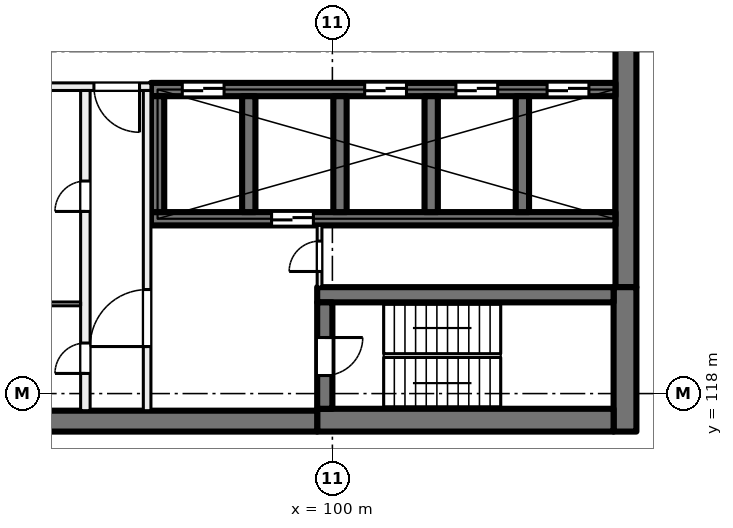
"""IFC4 building model, lengths in metres.
Left out: names, types, materials, properties, quantities, classifications, styles, units other than length and angle.
Written with IfcOpenShell. Run it as: python <this file> out.ifc"""

import sys

from ifc_helpers import new_model, si_unit, direction, frame, frame_2d, origin, place, context, subcontext, project, spatial, rectangle, extrude, element, fill, save


model = new_model("IFC4")
c1 = context("Model", 3, precision=1e-05, world=origin(), true_north=direction((0.0, 1.0)))
c2 = subcontext(c1, "Body", "Model", "MODEL_VIEW")
j1 = project(units=[si_unit("LENGTHUNIT", "METRE"), si_unit("PLANEANGLEUNIT", "RADIAN")], contexts=[c1])
p1 = place(None, origin())
s1 = spatial("IfcSite", under=j1, at=p1, CompositionType="ELEMENT")
p2 = place(p1, origin())
s2 = spatial("IfcBuilding", under=s1, at=p2, CompositionType="ELEMENT")
p3 = place(p2, frame((0.0, 0.0, 138.5)))
s3 = spatial("IfcBuildingStorey", under=s2, at=p3, CompositionType="ELEMENT", Elevation=138.5)
p4 = place(p3, frame((107.725, 135.2, 0.0), z_axis=(0.0, 0.0, 1.0), x_axis=(0.0, -1.0, 0.0)))
e1 = element("IfcWall", 1, at=p4, inside=s3, PredefinedType="SHEAR", context=c2, shape_type="SweptSolid", body=[
    extrude(rectangle(XDim=14.4, YDim=0.55, at=frame_2d((7.2, 0.0))), origin(), (0.0, 0.0, 1.0), 4.0),
])
p5 = place(p3, frame((107.7, 120.8, 0.0), z_axis=(0.0, 0.0, 1.0), x_axis=(0.0, -1.0, 0.0)))
e2 = element("IfcWall", 2, at=p5, inside=s3, PredefinedType="SHEAR", context=c2, shape_type="SweptSolid", body=[
    extrude(rectangle(XDim=3.8, YDim=0.6, at=frame_2d((1.9, 0.0))), origin(), (0.0, 0.0, 1.0), 4.0),
])
p6 = place(p3, frame((107.4, 117.3, 0.0), z_axis=(0.0, 0.0, 1.0), x_axis=(-1.0, 0.0, 0.0)))
e3 = element("IfcWall", 3, at=p6, inside=s3, PredefinedType="SHEAR", context=c2, shape_type="SweptSolid", body=[
    extrude(rectangle(XDim=7.8, YDim=0.6, at=frame_2d((3.9, 0.0))), origin(), (0.0, 0.0, 1.0), 4.0),
])
p7 = place(p3, frame((99.6, 117.275, 0.0), z_axis=(0.0, 0.0, 1.0), x_axis=(-1.0, 0.0, 0.0)))
e4 = element("IfcWall", 4, at=p7, inside=s3, PredefinedType="SHEAR", context=c2, shape_type="SweptSolid", body=[
    extrude(rectangle(XDim=8.95, YDim=0.55, at=frame_2d((4.475, 0.0))), origin(), (0.0, 0.0, 1.0), 4.0),
])
p8 = place(p3, frame((107.4, 120.6, 0.0), z_axis=(0.0, 0.0, 1.0), x_axis=(-1.0, 0.0, 0.0)))
e5 = element("IfcWall", 5, at=p8, inside=s3, PredefinedType="SHEAR", context=c2, shape_type="SweptSolid", body=[
    extrude(rectangle(XDim=7.8, YDim=0.4, at=frame_2d((3.9, 0.0))), origin(), (0.0, 0.0, 1.0), 4.0),
])
p9 = place(p3, frame((99.8, 120.4, 0.0), z_axis=(0.0, 0.0, 1.0), x_axis=(0.0, -1.0, 0.0)))
e6 = element("IfcWall", 6, at=p9, inside=s3, PredefinedType="SHEAR", context=c2, shape_type="SweptSolid", body=[
    extrude(rectangle(XDim=2.8, YDim=0.4, at=frame_2d((1.4, 0.0))), origin(), (0.0, 0.0, 1.0), 4.0),
])
p10 = place(p9, frame((0.925, 0.0, 0.0)))
e7 = element("IfcOpeningElement", 7, at=p10, cuts=e6, PredefinedType="OPENING", context=c2, shape_type="SweptSolid", body=[
    extrude(rectangle(XDim=1.0, YDim=2.1, at=frame_2d((0.5, 1.05))), frame((0.0, 0.21, 0.0), z_axis=(0.0, -1.0, 0.0), x_axis=(1.0, 0.0, 0.0)), (0.0, 0.0, 1.0), 0.42),
])
p11 = place(p3, frame((107.45, 126.0, 0.0), z_axis=(0.0, 0.0, 1.0), x_axis=(-1.0, 0.0, 0.0)))
e8 = element("IfcWall", 8, at=p11, inside=s3, PredefinedType="SHEAR", context=c2, shape_type="SweptSolid", body=[
    extrude(rectangle(XDim=12.225, YDim=0.35, at=frame_2d((6.112, 0.0))), origin(), (0.0, 0.0, 1.0), 4.0),
])
p12 = place(p11, frame((0.7, 0.0, 0.0)))
e9 = element("IfcOpeningElement", 9, at=p12, cuts=e8, PredefinedType="OPENING", context=c2, shape_type="SweptSolid", body=[
    extrude(rectangle(XDim=1.1, YDim=2.1, at=frame_2d((0.55, 1.05))), frame((0.0, 0.185, 0.0), z_axis=(0.0, -1.0, 0.0), x_axis=(1.0, 0.0, 0.0)), (0.0, 0.0, 1.0), 0.37),
])
p13 = place(p11, frame((3.1, 0.0, 0.0)))
e10 = element("IfcOpeningElement", 10, at=p13, cuts=e8, PredefinedType="OPENING", context=c2, shape_type="SweptSolid", body=[
    extrude(rectangle(XDim=1.1, YDim=2.1, at=frame_2d((0.55, 1.05))), frame((0.0, 0.185, 0.0), z_axis=(0.0, -1.0, 0.0), x_axis=(1.0, 0.0, 0.0)), (0.0, 0.0, 1.0), 0.37),
])
p14 = place(p11, frame((5.5, 0.0, 0.0)))
e11 = element("IfcOpeningElement", 11, at=p14, cuts=e8, PredefinedType="OPENING", context=c2, shape_type="SweptSolid", body=[
    extrude(rectangle(XDim=1.1, YDim=2.1, at=frame_2d((0.55, 1.05))), frame((0.0, 0.185, 0.0), z_axis=(0.0, -1.0, 0.0), x_axis=(1.0, 0.0, 0.0)), (0.0, 0.0, 1.0), 0.37),
])
p15 = place(p11, frame((10.3, 0.0, 0.0)))
e12 = element("IfcOpeningElement", 12, at=p15, cuts=e8, PredefinedType="OPENING", context=c2, shape_type="SweptSolid", body=[
    extrude(rectangle(XDim=1.1, YDim=2.1, at=frame_2d((0.55, 1.05))), frame((0.0, 0.185, 0.0), z_axis=(0.0, -1.0, 0.0), x_axis=(1.0, 0.0, 0.0)), (0.0, 0.0, 1.0), 0.37),
])
p16 = place(p3, frame((107.45, 122.6, 0.0), z_axis=(0.0, 0.0, 1.0), x_axis=(-1.0, 0.0, 0.0)))
e13 = element("IfcWall", 13, at=p16, inside=s3, PredefinedType="SHEAR", context=c2, shape_type="SweptSolid", body=[
    extrude(rectangle(XDim=12.225, YDim=0.35, at=frame_2d((6.112, 0.0))), origin(), (0.0, 0.0, 1.0), 4.0),
])
p17 = place(p16, frame((7.95, 0.0, 0.0)))
e14 = element("IfcOpeningElement", 14, at=p17, cuts=e13, PredefinedType="OPENING", context=c2, shape_type="SweptSolid", body=[
    extrude(rectangle(XDim=1.1, YDim=2.1, at=frame_2d((0.55, 1.05))), frame((0.0, 0.185, 0.0), z_axis=(0.0, -1.0, 0.0), x_axis=(1.0, 0.0, 0.0)), (0.0, 0.0, 1.0), 0.37),
])
for number, where, z_axis, x_axis in (
    (15, (105.0, 125.825, 0.0), (0.0, 0.0, 1.0), (0.0, -1.0, 0.0)),
    (16, (102.6, 125.825, 0.0), (0.0, 0.0, 1.0), (0.0, -1.0, 0.0)),
    (17, (100.2, 125.825, 0.0), (0.0, 0.0, 1.0), (0.0, -1.0, 0.0)),
    (18, (97.8, 125.825, 0.0), (0.0, 0.0, 1.0), (0.0, -1.0, 0.0)),
    (19, (95.4, 125.825, 0.0), (0.0, 0.0, 1.0), (0.0, -1.0, 0.0)),
):
    element("IfcWall", number, at=place(p3, frame(where, z_axis=z_axis, x_axis=x_axis)), inside=s3, PredefinedType="SHEAR", context=c2, shape_type="SweptSolid", body=[
        extrude(rectangle(XDim=3.05, YDim=0.35, at=frame_2d((1.525, 0.0))), origin(), (0.0, 0.0, 1.0), 4.0),
    ])
p18 = place(p3, frame((95.225, 126.075, 0.0), z_axis=(0.0, 0.0, 1.0), x_axis=(-1.0, 0.0, 0.0)))
e20 = element("IfcWall", 20, at=p18, inside=s3, PredefinedType="PARTITIONING", context=c2, shape_type="SweptSolid", body=[
    extrude(rectangle(XDim=3.875, YDim=0.2, at=frame_2d((1.938, 0.0))), origin(), (0.0, 0.0, 1.0), 3.625),
])
p19 = place(p18, frame((0.3, 0.0, 0.0)))
e21 = element("IfcOpeningElement", 21, at=p19, cuts=e20, PredefinedType="OPENING", context=c2, shape_type="SweptSolid", body=[
    extrude(rectangle(XDim=1.2, YDim=2.1, at=frame_2d((0.6, 1.05))), frame((0.0, 0.11, 0.0), z_axis=(0.0, -1.0, 0.0), x_axis=(1.0, 0.0, 0.0)), (0.0, 0.0, 1.0), 0.22),
])
p20 = place(p3, frame((95.125, 117.55, 0.0), z_axis=(0.0, 0.0, 1.0), x_axis=(0.0, 1.0, 0.0)))
e22 = element("IfcWall", 22, at=p20, inside=s3, PredefinedType="PARTITIONING", context=c2, shape_type="SweptSolid", body=[
    extrude(rectangle(XDim=8.425, YDim=0.2, at=frame_2d((4.212, 0.0))), origin(), (0.0, 0.0, 1.0), 3.625),
])
p21 = place(p20, frame((1.688, 0.0, 0.0)))
e23 = element("IfcOpeningElement", 23, at=p21, cuts=e22, PredefinedType="OPENING", context=c2, shape_type="SweptSolid", body=[
    extrude(rectangle(XDim=1.5, YDim=2.1, at=frame_2d((0.75, 1.05))), frame((0.0, 0.11, 0.0), z_axis=(0.0, -1.0, 0.0), x_axis=(1.0, 0.0, 0.0)), (0.0, 0.0, 1.0), 0.22),
])
p22 = place(p3, frame((93.5, 117.55, 0.0), z_axis=(0.0, 0.0, 1.0), x_axis=(0.0, 1.0, 0.0)))
e24 = element("IfcWall", 24, at=p22, inside=s3, PredefinedType="PARTITIONING", context=c2, shape_type="SweptSolid", body=[
    extrude(rectangle(XDim=8.425, YDim=0.25, at=frame_2d((4.212, 0.0))), origin(), (0.0, 0.0, 1.0), 3.625),
])
p23 = place(p22, frame((5.242, 0.0, 0.0)))
e25 = element("IfcOpeningElement", 25, at=p23, cuts=e24, PredefinedType="OPENING", context=c2, shape_type="SweptSolid", body=[
    extrude(rectangle(XDim=0.8, YDim=2.1, at=frame_2d((0.4, 1.05))), frame((0.0, 0.135, 0.0), z_axis=(0.0, -1.0, 0.0), x_axis=(1.0, 0.0, 0.0)), (0.0, 0.0, 1.0), 0.27),
])
p24 = place(p22, frame((0.98, 0.0, 0.0)))
e26 = element("IfcOpeningElement", 26, at=p24, cuts=e24, PredefinedType="OPENING", context=c2, shape_type="SweptSolid", body=[
    extrude(rectangle(XDim=0.8, YDim=2.1, at=frame_2d((0.4, 1.05))), frame((0.0, 0.135, 0.0), z_axis=(0.0, -1.0, 0.0), x_axis=(1.0, 0.0, 0.0)), (0.0, 0.0, 1.0), 0.27),
])
p25 = place(p3, frame((99.663, 120.8, 0.0), z_axis=(0.0, 0.0, 1.0), x_axis=(0.0, 1.0, 0.0)))
e27 = element("IfcWall", 27, at=p25, inside=s3, PredefinedType="PARTITIONING", context=c2, shape_type="SweptSolid", body=[
    extrude(rectangle(XDim=1.625, YDim=0.125, at=frame_2d((0.812, 0.0))), origin(), (0.0, 0.0, 1.0), 3.625),
])
p26 = place(p25, frame((0.413, 0.0, 0.0)))
e28 = element("IfcOpeningElement", 28, at=p26, cuts=e27, PredefinedType="OPENING", context=c2, shape_type="SweptSolid", body=[
    extrude(rectangle(XDim=0.8, YDim=2.1, at=frame_2d((0.4, 1.05))), frame((0.0, 0.073, 0.0), z_axis=(0.0, -1.0, 0.0), x_axis=(1.0, 0.0, 0.0)), (0.0, 0.0, 1.0), 0.145),
])
p27 = place(p3, frame((93.375, 120.36, 0.0), z_axis=(0.0, 0.0, 1.0), x_axis=(-1.0, 0.0, 0.0)))
e29 = element("IfcWall", 29, at=p27, inside=s3, PredefinedType="PARTITIONING", context=c2, shape_type="SweptSolid", body=[
    extrude(rectangle(XDim=2.025, YDim=0.1, at=frame_2d((1.012, 0.0))), origin(), (0.0, 0.0, 1.0), 3.625),
])
p28 = place(p12, origin())
e30 = element("IfcDoor", 30, at=p28, inside=s3, OperationType="DOUBLE_DOOR_SLIDING", PredefinedType="DOOR", context=c2, shape_type="SweptSolid", body=[
    extrude(rectangle(XDim=1.1, YDim=2.1, at=frame_2d((0.55, 1.05))), frame((0.0, 0.025, 0.0), z_axis=(0.0, -1.0, 0.0), x_axis=(1.0, 0.0, 0.0)), (0.0, 0.0, 1.0), 0.05),
])
fill(e9, e30)
p29 = place(p13, origin())
e31 = element("IfcDoor", 31, at=p29, inside=s3, OperationType="DOUBLE_DOOR_SLIDING", PredefinedType="DOOR", context=c2, shape_type="SweptSolid", body=[
    extrude(rectangle(XDim=1.1, YDim=2.1, at=frame_2d((0.55, 1.05))), frame((0.0, 0.025, 0.0), z_axis=(0.0, -1.0, 0.0), x_axis=(1.0, 0.0, 0.0)), (0.0, 0.0, 1.0), 0.05),
])
fill(e10, e31)
p30 = place(p14, origin())
e32 = element("IfcDoor", 32, at=p30, inside=s3, OperationType="DOUBLE_DOOR_SLIDING", PredefinedType="DOOR", context=c2, shape_type="SweptSolid", body=[
    extrude(rectangle(XDim=1.1, YDim=2.1, at=frame_2d((0.55, 1.05))), frame((0.0, 0.025, 0.0), z_axis=(0.0, -1.0, 0.0), x_axis=(1.0, 0.0, 0.0)), (0.0, 0.0, 1.0), 0.05),
])
fill(e11, e32)
p31 = place(p15, origin())
e33 = element("IfcDoor", 33, at=p31, inside=s3, OperationType="DOUBLE_DOOR_SLIDING", PredefinedType="DOOR", context=c2, shape_type="SweptSolid", body=[
    extrude(rectangle(XDim=1.1, YDim=2.1, at=frame_2d((0.55, 1.05))), frame((0.0, 0.025, 0.0), z_axis=(0.0, -1.0, 0.0), x_axis=(1.0, 0.0, 0.0)), (0.0, 0.0, 1.0), 0.05),
])
fill(e12, e33)
p32 = place(p19, origin())
e34 = element("IfcDoor", 34, at=p32, inside=s3, OperationType="DOUBLE_DOOR_SINGLE_SWING", PredefinedType="DOOR", context=c2, shape_type="SweptSolid", body=[
    extrude(rectangle(XDim=1.2, YDim=2.1, at=frame_2d((0.6, 1.05))), frame((0.0, 0.025, 0.0), z_axis=(0.0, -1.0, 0.0), x_axis=(1.0, 0.0, 0.0)), (0.0, 0.0, 1.0), 0.05),
])
fill(e21, e34)
p33 = place(p21, origin())
e35 = element("IfcDoor", 35, at=p33, inside=s3, OperationType="DOUBLE_DOOR_SINGLE_SWING", PredefinedType="DOOR", context=c2, shape_type="SweptSolid", body=[
    extrude(rectangle(XDim=1.5, YDim=2.1, at=frame_2d((0.75, 1.05))), frame((0.0, 0.025, 0.0), z_axis=(0.0, -1.0, 0.0), x_axis=(1.0, 0.0, 0.0)), (0.0, 0.0, 1.0), 0.05),
])
fill(e23, e35)
p34 = place(p10, origin())
e36 = element("IfcDoor", 36, at=p34, inside=s3, OperationType="SINGLE_SWING_LEFT", PredefinedType="DOOR", context=c2, shape_type="SweptSolid", body=[
    extrude(rectangle(XDim=1.0, YDim=2.1, at=frame_2d((0.5, 1.05))), frame((0.0, 0.025, 0.0), z_axis=(0.0, -1.0, 0.0), x_axis=(1.0, 0.0, 0.0)), (0.0, 0.0, 1.0), 0.05),
])
fill(e7, e36)
p35 = place(p26, origin())
e37 = element("IfcDoor", 37, at=p35, inside=s3, OperationType="SINGLE_SWING_RIGHT", PredefinedType="DOOR", context=c2, shape_type="SweptSolid", body=[
    extrude(rectangle(XDim=0.8, YDim=2.1, at=frame_2d((0.4, 1.05))), frame((0.0, 0.025, 0.0), z_axis=(0.0, -1.0, 0.0), x_axis=(1.0, 0.0, 0.0)), (0.0, 0.0, 1.0), 0.05),
])
fill(e28, e37)
p36 = place(p23, origin())
e38 = element("IfcDoor", 38, at=p36, inside=s3, OperationType="SINGLE_SWING_LEFT", PredefinedType="DOOR", context=c2, shape_type="SweptSolid", body=[
    extrude(rectangle(XDim=0.8, YDim=2.1, at=frame_2d((0.4, 1.05))), frame((0.0, 0.025, 0.0), z_axis=(0.0, -1.0, 0.0), x_axis=(1.0, 0.0, 0.0)), (0.0, 0.0, 1.0), 0.05),
])
fill(e25, e38)
p37 = place(p24, origin())
e39 = element("IfcDoor", 39, at=p37, inside=s3, OperationType="SINGLE_SWING_RIGHT", PredefinedType="DOOR", context=c2, shape_type="SweptSolid", body=[
    extrude(rectangle(XDim=0.8, YDim=2.1, at=frame_2d((0.4, 1.05))), frame((0.0, 0.025, 0.0), z_axis=(0.0, -1.0, 0.0), x_axis=(1.0, 0.0, 0.0)), (0.0, 0.0, 1.0), 0.05),
])
fill(e26, e39)
p38 = place(p17, origin())
e40 = element("IfcDoor", 40, at=p38, inside=s3, OperationType="DOUBLE_DOOR_SLIDING", PredefinedType="DOOR", context=c2, shape_type="SweptSolid", body=[
    extrude(rectangle(XDim=1.1, YDim=2.1, at=frame_2d((0.55, 1.05))), frame((0.0, 0.025, 0.0), z_axis=(0.0, -1.0, 0.0), x_axis=(1.0, 0.0, 0.0)), (0.0, 0.0, 1.0), 0.05),
])
fill(e14, e40)
save(model, sys.argv[1])
